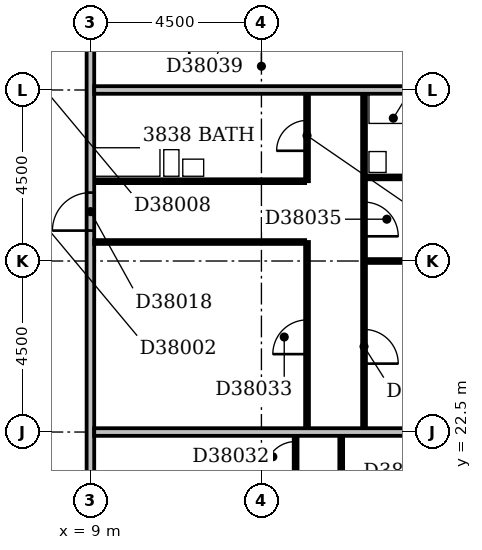
"""IFC4 building model, lengths in metres.
Left out: names, types, materials, properties, quantities, classifications, styles, units other than length and angle.
Written with IfcOpenShell. Run it as: python <this file> out.ifc"""

import sys

from ifc_helpers import new_model, si_unit, direction, frame, frame_2d, origin, place, context, subcontext, project, spatial, rectangle, extrude, element, fill, save


model = new_model("IFC4")
c1 = context("Model", 3, precision=1e-05, world=origin(), true_north=direction((0.0, 1.0)))
c2 = subcontext(c1, "Body", "Model", "MODEL_VIEW")
j1 = project(units=[si_unit("LENGTHUNIT", "METRE"), si_unit("PLANEANGLEUNIT", "RADIAN")], contexts=[c1])
p1 = place(None, origin())
s1 = spatial("IfcSite", under=j1, at=p1, CompositionType="ELEMENT")
p2 = place(p1, origin())
s2 = spatial("IfcBuilding", under=s1, at=p2, CompositionType="ELEMENT")
p3 = place(p2, frame((0.0, 0.0, 152.0)))
s3 = spatial("IfcBuildingStorey", under=s2, at=p3, CompositionType="ELEMENT", Elevation=152.0)
p4 = place(p3, frame((9.0, 5.0, 0.0), z_axis=(0.0, 0.0, 1.0), x_axis=(0.0, 1.0, 0.0)))
e1 = element("IfcWall", 1, at=p4, inside=s3, PredefinedType="PARTITIONING", context=c2, shape_type="SweptSolid", body=[
    extrude(rectangle(XDim=27.75, YDim=0.2, at=frame_2d((13.875, 0.0))), origin(), (0.0, 0.0, 1.0), 3.3),
])
p5 = place(p4, frame((22.8, 0.0, 0.0)))
e2 = element("IfcOpeningElement", 2, at=p5, cuts=e1, PredefinedType="OPENING", context=c2, shape_type="SweptSolid", body=[
    extrude(rectangle(XDim=1.0, YDim=2.1, at=frame_2d((0.5, 1.05))), frame((0.0, 0.112, 0.0), z_axis=(0.0, -1.0, 0.0), x_axis=(1.0, 0.0, 0.0)), (0.0, 0.0, 1.0), 0.224),
])
p6 = place(p4, frame((14.95, 0.0, 0.0)))
e3 = element("IfcOpeningElement", 3, at=p6, cuts=e1, PredefinedType="OPENING", context=c2, shape_type="SweptSolid", body=[
    extrude(rectangle(XDim=1.0, YDim=2.1, at=frame_2d((0.5, 1.05))), frame((0.0, 0.112, 0.0), z_axis=(0.0, -1.0, 0.0), x_axis=(1.0, 0.0, 0.0)), (0.0, 0.0, 1.0), 0.224),
])
p7 = place(p4, frame((10.45, 0.0, 0.0)))
e4 = element("IfcOpeningElement", 4, at=p7, cuts=e1, PredefinedType="OPENING", context=c2, shape_type="SweptSolid", body=[
    extrude(rectangle(XDim=1.0, YDim=2.1, at=frame_2d((0.5, 1.05))), frame((0.0, 0.112, 0.0), z_axis=(0.0, -1.0, 0.0), x_axis=(1.0, 0.0, 0.0)), (0.0, 0.0, 1.0), 0.224),
])
p8 = place(p4, frame((5.95, 0.0, 0.0)))
e5 = element("IfcOpeningElement", 5, at=p8, cuts=e1, PredefinedType="OPENING", context=c2, shape_type="SweptSolid", body=[
    extrude(rectangle(XDim=1.0, YDim=2.1, at=frame_2d((0.5, 1.05))), frame((0.0, 0.112, 0.0), z_axis=(0.0, -1.0, 0.0), x_axis=(1.0, 0.0, 0.0)), (0.0, 0.0, 1.0), 0.224),
])
p9 = place(p4, frame((1.5, 0.0, 0.0)))
e6 = element("IfcOpeningElement", 6, at=p9, cuts=e1, PredefinedType="OPENING", context=c2, shape_type="SweptSolid", body=[
    extrude(rectangle(XDim=0.9, YDim=2.1, at=frame_2d((0.45, 1.05))), frame((0.0, 0.112, 0.0), z_axis=(0.0, -1.0, 0.0), x_axis=(1.0, 0.0, 0.0)), (0.0, 0.0, 1.0), 0.224),
])
p10 = place(p3, frame((15.6, 18.1, 0.0), z_axis=(0.0, 0.0, 1.0), x_axis=(0.0, 1.0, 0.0)))
e7 = element("IfcWall", 7, at=p10, inside=s3, PredefinedType="PARTITIONING", context=c2, shape_type="SweptSolid", body=[
    extrude(rectangle(XDim=4.3, YDim=0.1, at=frame_2d((2.15, 0.0))), origin(), (0.0, 0.0, 1.0), 3.3),
])
p11 = place(p10, frame((1.7, 0.0, 0.0)))
e8 = element("IfcOpeningElement", 8, at=p11, cuts=e7, PredefinedType="OPENING", context=c2, shape_type="SweptSolid", body=[
    extrude(rectangle(XDim=0.9, YDim=2.1, at=frame_2d((0.45, 1.05))), frame((0.0, 0.062, 0.0), z_axis=(0.0, -1.0, 0.0), x_axis=(1.0, 0.0, 0.0)), (0.0, 0.0, 1.0), 0.124),
])
p12 = place(p3, frame((14.4, 21.2, 0.0), z_axis=(0.0, 0.0, 1.0), x_axis=(0.0, 1.0, 0.0)))
e9 = element("IfcWall", 9, at=p12, inside=s3, PredefinedType="PARTITIONING", context=c2, shape_type="SweptSolid", body=[
    extrude(rectangle(XDim=1.2, YDim=0.1, at=frame_2d((0.6, 0.0))), origin(), (0.0, 0.0, 1.0), 3.3),
])
p13 = place(p12, frame((0.25, 0.0, 0.0)))
e10 = element("IfcOpeningElement", 10, at=p13, cuts=e9, PredefinedType="OPENING", context=c2, shape_type="SweptSolid", body=[
    extrude(rectangle(XDim=0.8, YDim=2.1, at=frame_2d((0.4, 1.05))), frame((0.0, 0.062, 0.0), z_axis=(0.0, -1.0, 0.0), x_axis=(1.0, 0.0, 0.0)), (0.0, 0.0, 1.0), 0.124),
])
p14 = place(p3, frame((9.1, 22.5, 0.0), z_axis=(0.0, 0.0, 1.0), x_axis=(1.0, 0.0, 0.0)))
e11 = element("IfcWall", 11, at=p14, inside=s3, PredefinedType="PARTITIONING", context=c2, shape_type="SweptSolid", body=[
    extrude(rectangle(XDim=12.9, YDim=0.2, at=frame_2d((6.45, 0.0))), origin(), (0.0, 0.0, 1.0), 3.3),
])
p15 = place(p3, frame((14.7, 22.6, 0.0), z_axis=(0.0, 0.0, 1.0), x_axis=(0.0, 1.0, 0.0)))
e12 = element("IfcWall", 12, at=p15, inside=s3, PredefinedType="PARTITIONING", context=c2, shape_type="SweptSolid", body=[
    extrude(rectangle(XDim=4.9, YDim=0.1, at=frame_2d((2.45, 0.0))), origin(), (0.0, 0.0, 1.0), 3.3),
])
p16 = place(p15, frame((1.95, 0.0, 0.0)))
e13 = element("IfcOpeningElement", 13, at=p16, cuts=e12, PredefinedType="OPENING", context=c2, shape_type="SweptSolid", body=[
    extrude(rectangle(XDim=0.9, YDim=2.1, at=frame_2d((0.45, 1.05))), frame((0.0, 0.062, 0.0), z_axis=(0.0, -1.0, 0.0), x_axis=(1.0, 0.0, 0.0)), (0.0, 0.0, 1.0), 0.124),
])
p17 = place(p3, frame((16.2, 22.6, 0.0), z_axis=(0.0, 0.0, 1.0), x_axis=(0.0, 1.0, 0.0)))
e14 = element("IfcWall", 14, at=p17, inside=s3, PredefinedType="PARTITIONING", context=c2, shape_type="SweptSolid", body=[
    extrude(rectangle(XDim=8.8, YDim=0.1, at=frame_2d((4.4, 0.0))), origin(), (0.0, 0.0, 1.0), 3.3),
])
p18 = place(p17, frame((1.7, 0.0, 0.0)))
e15 = element("IfcOpeningElement", 15, at=p18, cuts=e14, PredefinedType="OPENING", context=c2, shape_type="SweptSolid", body=[
    extrude(rectangle(XDim=0.9, YDim=2.1, at=frame_2d((0.45, 1.05))), frame((0.0, 0.062, 0.0), z_axis=(0.0, -1.0, 0.0), x_axis=(1.0, 0.0, 0.0)), (0.0, 0.0, 1.0), 0.124),
])
p19 = place(p17, frame((5.05, 0.0, 0.0)))
e16 = element("IfcOpeningElement", 16, at=p19, cuts=e14, PredefinedType="OPENING", context=c2, shape_type="SweptSolid", body=[
    extrude(rectangle(XDim=0.9, YDim=2.1, at=frame_2d((0.45, 1.05))), frame((0.0, 0.062, 0.0), z_axis=(0.0, -1.0, 0.0), x_axis=(1.0, 0.0, 0.0)), (0.0, 0.0, 1.0), 0.124),
])
p20 = place(p3, frame((16.25, 27.0, 0.0), z_axis=(0.0, 0.0, 1.0), x_axis=(1.0, 0.0, 0.0)))
e17 = element("IfcWall", 17, at=p20, inside=s3, PredefinedType="PARTITIONING", context=c2, shape_type="SweptSolid", body=[
    extrude(rectangle(XDim=5.75, YDim=0.1, at=frame_2d((2.875, 0.0))), origin(), (0.0, 0.0, 1.0), 2.7),
])
p21 = place(p3, frame((9.1, 27.5, 0.0), z_axis=(0.0, 0.0, 1.0), x_axis=(1.0, 0.0, 0.0)))
e18 = element("IfcWall", 18, at=p21, inside=s3, PredefinedType="PARTITIONING", context=c2, shape_type="SweptSolid", body=[
    extrude(rectangle(XDim=5.55, YDim=0.1, at=frame_2d((2.775, 0.0))), origin(), (0.0, 0.0, 1.0), 2.7),
])
p22 = place(p3, frame((9.1, 29.1, 0.0), z_axis=(0.0, 0.0, 1.0), x_axis=(1.0, 0.0, 0.0)))
e19 = element("IfcWall", 19, at=p22, inside=s3, PredefinedType="PLUMBINGWALL", context=c2, shape_type="SweptSolid", body=[
    extrude(rectangle(XDim=5.55, YDim=0.1, at=frame_2d((2.775, 0.0))), origin(), (0.0, 0.0, 1.0), 3.3),
])
p23 = place(p3, frame((14.7, 29.1, 0.0), z_axis=(0.0, 0.0, 1.0), x_axis=(0.0, 1.0, 0.0)))
e20 = element("IfcWall", 20, at=p23, inside=s3, PredefinedType="PARTITIONING", context=c2, shape_type="SweptSolid", body=[
    extrude(rectangle(XDim=2.3, YDim=0.1, at=frame_2d((1.15, 0.0))), origin(), (0.0, 0.0, 1.0), 3.3),
])
p24 = place(p23, frame((0.8, 0.0, 0.0)))
e21 = element("IfcOpeningElement", 21, at=p24, cuts=e20, PredefinedType="OPENING", context=c2, shape_type="SweptSolid", body=[
    extrude(rectangle(XDim=0.8, YDim=2.1, at=frame_2d((0.4, 1.05))), frame((0.0, 0.062, 0.0), z_axis=(0.0, -1.0, 0.0), x_axis=(1.0, 0.0, 0.0)), (0.0, 0.0, 1.0), 0.124),
])
p25 = place(p3, frame((16.25, 29.2, 0.0), z_axis=(0.0, 0.0, 1.0), x_axis=(1.0, 0.0, 0.0)))
e22 = element("IfcWall", 22, at=p25, inside=s3, PredefinedType="PLUMBINGWALL", context=c2, shape_type="SweptSolid", body=[
    extrude(rectangle(XDim=2.8, YDim=0.1, at=frame_2d((1.4, 0.0))), origin(), (0.0, 0.0, 1.0), 3.3),
])
p26 = place(p25, frame((1.0, 0.0, 0.0)))
e23 = element("IfcOpeningElement", 23, at=p26, cuts=e22, PredefinedType="OPENING", context=c2, shape_type="SweptSolid", body=[
    extrude(rectangle(XDim=0.8, YDim=2.1, at=frame_2d((0.4, 1.05))), frame((0.0, 0.062, 0.0), z_axis=(0.0, -1.0, 0.0), x_axis=(1.0, 0.0, 0.0)), (0.0, 0.0, 1.0), 0.124),
])
p27 = place(p3, frame((9.1, 31.5, 0.0), z_axis=(0.0, 0.0, 1.0), x_axis=(1.0, 0.0, 0.0)))
e24 = element("IfcWall", 24, at=p27, inside=s3, PredefinedType="PARTITIONING", context=c2, shape_type="SweptSolid", body=[
    extrude(rectangle(XDim=12.9, YDim=0.2, at=frame_2d((6.45, 0.0))), origin(), (0.0, 0.0, 1.0), 3.3),
])
p28 = place(p5, origin())
e25 = element("IfcDoor", 25, at=p28, inside=s3, OperationType="SINGLE_SWING_LEFT", PredefinedType="DOOR", context=c2, shape_type="SweptSolid", body=[
    extrude(rectangle(XDim=1.0, YDim=2.1, at=frame_2d((0.5, 1.05))), frame((0.0, 0.025, 0.0), z_axis=(0.0, -1.0, 0.0), x_axis=(1.0, 0.0, 0.0)), (0.0, 0.0, 1.0), 0.05),
])
fill(e2, e25)
p29 = place(p13, origin())
e26 = element("IfcDoor", 26, at=p29, inside=s3, OperationType="SINGLE_SWING_LEFT", PredefinedType="DOOR", context=c2, shape_type="SweptSolid", body=[
    extrude(rectangle(XDim=0.8, YDim=2.1, at=frame_2d((0.4, 1.05))), frame((0.0, 0.025, 0.0), z_axis=(0.0, -1.0, 0.0), x_axis=(1.0, 0.0, 0.0)), (0.0, 0.0, 1.0), 0.05),
])
fill(e10, e26)
p30 = place(p16, origin())
e27 = element("IfcDoor", 27, at=p30, inside=s3, OperationType="SINGLE_SWING_LEFT", PredefinedType="DOOR", context=c2, shape_type="SweptSolid", body=[
    extrude(rectangle(XDim=0.9, YDim=2.1, at=frame_2d((0.45, 1.05))), frame((0.0, 0.025, 0.0), z_axis=(0.0, -1.0, 0.0), x_axis=(1.0, 0.0, 0.0)), (0.0, 0.0, 1.0), 0.05),
])
fill(e13, e27)
p31 = place(p18, frame((0.9, 0.0, 0.0), z_axis=(0.0, 0.0, 1.0), x_axis=(-1.0, 0.0, 0.0)))
e28 = element("IfcDoor", 28, at=p31, inside=s3, OperationType="SINGLE_SWING_RIGHT", PredefinedType="DOOR", context=c2, shape_type="SweptSolid", body=[
    extrude(rectangle(XDim=0.9, YDim=2.1, at=frame_2d((0.45, 1.05))), frame((0.0, 0.025, 0.0), z_axis=(0.0, -1.0, 0.0), x_axis=(1.0, 0.0, 0.0)), (0.0, 0.0, 1.0), 0.05),
])
fill(e15, e28)
p32 = place(p19, frame((0.9, 0.0, 0.0), z_axis=(0.0, 0.0, 1.0), x_axis=(-1.0, 0.0, 0.0)))
e29 = element("IfcDoor", 29, at=p32, inside=s3, OperationType="SINGLE_SWING_RIGHT", PredefinedType="DOOR", context=c2, shape_type="SweptSolid", body=[
    extrude(rectangle(XDim=0.9, YDim=2.1, at=frame_2d((0.45, 1.05))), frame((0.0, 0.025, 0.0), z_axis=(0.0, -1.0, 0.0), x_axis=(1.0, 0.0, 0.0)), (0.0, 0.0, 1.0), 0.05),
])
fill(e16, e29)
p33 = place(p24, origin())
e30 = element("IfcDoor", 30, at=p33, inside=s3, OperationType="SINGLE_SWING_LEFT", PredefinedType="DOOR", context=c2, shape_type="SweptSolid", body=[
    extrude(rectangle(XDim=0.8, YDim=2.1, at=frame_2d((0.4, 1.05))), frame((0.0, 0.025, 0.0), z_axis=(0.0, -1.0, 0.0), x_axis=(1.0, 0.0, 0.0)), (0.0, 0.0, 1.0), 0.05),
])
fill(e21, e30)
save(model, sys.argv[1])
